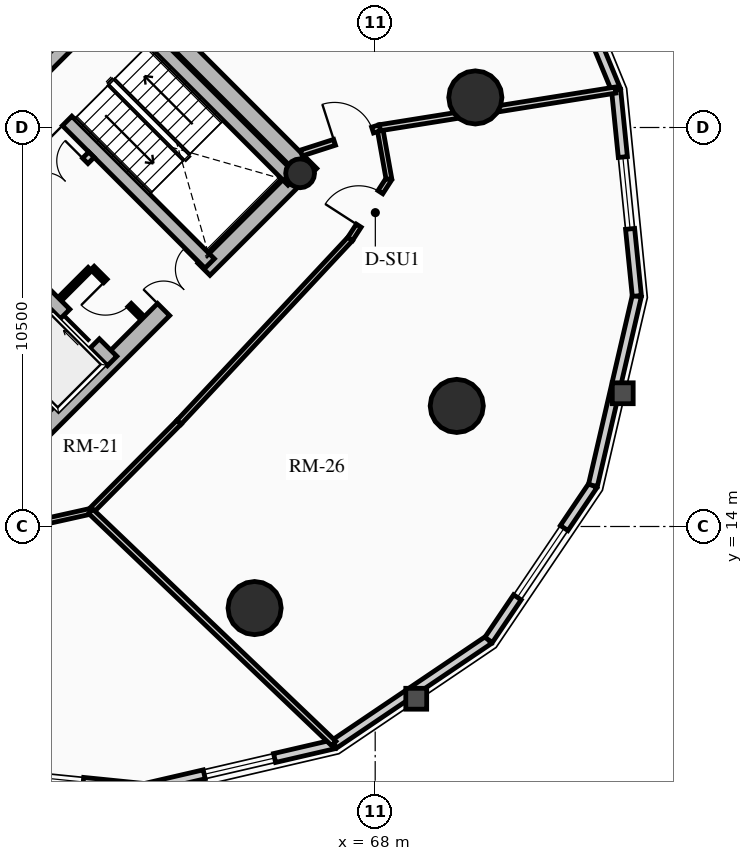
"""IFC4 building model, lengths in metres.
Left out: names, types, materials, properties, quantities, classifications, styles, units other than length and angle.
Written with IfcOpenShell. Run it as: python <this file> out.ifc"""

import sys

from ifc_helpers import new_model, si_unit, direction, frame, frame_2d, origin, origin_2d, place, context, subcontext, project, spatial, rectangle, circle, hollow_circle, extrude, source, transform, mapped, element, fill, save


model = new_model("IFC4")
c1 = context("Model", 3, precision=1e-05, world=origin(), true_north=direction((0.0, 1.0)))
c2 = subcontext(c1, "Body", "Model", "MODEL_VIEW")
j1 = project(units=[si_unit("LENGTHUNIT", "METRE"), si_unit("PLANEANGLEUNIT", "RADIAN")], contexts=[c1])
p1 = place(None, origin())
s1 = spatial("IfcSite", under=j1, at=p1, CompositionType="ELEMENT")
p2 = place(p1, origin())
s2 = spatial("IfcBuilding", under=s1, at=p2, CompositionType="ELEMENT")
p3 = place(p2, frame((0.0, 0.0, 132.88)))
s3 = spatial("IfcBuildingStorey", under=s2, at=p3, CompositionType="ELEMENT", Elevation=132.88)
p4 = place(p3, frame((66.303, 23.263, 0.0), z_axis=(0.0, 0.0, 1.0), x_axis=(-0.707106781187, 0.707106781187, 0.0)))
e1 = element("IfcWall", 1, at=p4, inside=s3, PredefinedType="SHEAR", context=c2, shape_type="SweptSolid", body=[
    extrude(rectangle(XDim=14.2, YDim=0.45, at=frame_2d((7.1, 0.0))), origin(), (0.0, 0.0, 1.0), 3.72),
])
p5 = place(p3, frame((58.578, 15.856, 0.0), z_axis=(0.0, 0.0, 1.0), x_axis=(0.707106781187, 0.707106781187, 0.0)))
e2 = element("IfcWall", 2, at=p5, inside=s3, PredefinedType="SHEAR", context=c2, shape_type="SweptSolid", body=[
    extrude(rectangle(XDim=10.7, YDim=0.45, at=frame_2d((5.35, 0.0))), origin(), (0.0, 0.0, 1.0), 3.72),
])
m1 = source(origin(), c2, "Body", "SweptSolid", [
    extrude(rectangle(XDim=1.5, YDim=2.02, at=frame_2d((0.75, 1.01))), frame((0.0, 0.235, 0.0), z_axis=(0.0, -1.0, 0.0), x_axis=(1.0, 0.0, 0.0)), (0.0, 0.0, 1.0), 0.47),
])
p6 = place(p5, frame((5.45, 0.0, 0.0)))
e3 = element("IfcOpeningElement", 3, at=p6, cuts=e2, PredefinedType="OPENING", context=c2, shape_type="MappedRepresentation", body=[
    mapped(m1, transform((0.0, 0.0, 0.0), x_axis=(1.0, 0.0, 0.0), y_axis=(0.0, 1.0, 0.0), z_axis=(0.0, 0.0, 1.0), scale=1.0)),
])
p7 = place(p3, frame((61.078, 18.355, 0.0), z_axis=(0.0, 0.0, 1.0), x_axis=(-0.707106781187, 0.707106781187, 0.0)))
e4 = element("IfcWall", 4, at=p7, inside=s3, PredefinedType="SHEAR", context=c2, shape_type="SweptSolid", body=[
    extrude(rectangle(XDim=13.75, YDim=0.35, at=frame_2d((6.875, 0.0))), origin(), (0.0, 0.0, 1.0), 3.72),
])
m2 = source(origin(), c2, "Body", "SweptSolid", [
    extrude(rectangle(XDim=1.1, YDim=2.015, at=frame_2d((0.55, 1.007))), frame((0.0, 0.185, 0.0), z_axis=(0.0, -1.0, 0.0), x_axis=(1.0, 0.0, 0.0)), (0.0, 0.0, 1.0), 0.37),
])
p8 = place(p7, frame((4.875, 0.0, 0.0)))
e5 = element("IfcOpeningElement", 5, at=p8, cuts=e4, PredefinedType="OPENING", context=c2, shape_type="MappedRepresentation", body=[
    mapped(m2, transform((0.0, 0.0, 0.0), x_axis=(1.0, 0.0, 0.0), y_axis=(0.0, 1.0, 0.0), z_axis=(0.0, 0.0, 1.0), scale=1.0)),
])
p9 = place(p7, frame((0.65, 0.0, 0.0)))
e6 = element("IfcOpeningElement", 6, at=p9, cuts=e4, PredefinedType="OPENING", context=c2, shape_type="MappedRepresentation", body=[
    mapped(m2, transform((0.0, 0.0, 0.0), x_axis=(1.0, 0.0, 0.0), y_axis=(0.0, 1.0, 0.0), z_axis=(0.0, 0.0, 1.0), scale=1.0)),
])
p10 = place(p7, frame((2.65, 0.0, 0.0)))
e7 = element("IfcOpeningElement", 7, at=p10, cuts=e4, PredefinedType="OPENING", context=c2, shape_type="MappedRepresentation", body=[
    mapped(m2, transform((0.0, 0.0, 0.0), x_axis=(1.0, 0.0, 0.0), y_axis=(0.0, 1.0, 0.0), z_axis=(0.0, 0.0, 1.0), scale=1.0)),
])
m3 = source(origin(), c2, "Body", "SweptSolid", [
    extrude(rectangle(XDim=1.15, YDim=2.02, at=frame_2d((0.575, 1.01))), frame((0.0, 0.185, 0.0), z_axis=(0.0, -1.0, 0.0), x_axis=(1.0, 0.0, 0.0)), (0.0, 0.0, 1.0), 0.37),
])
p11 = place(p7, frame((7.295, 0.0, 0.0)))
e8 = element("IfcOpeningElement", 8, at=p11, cuts=e4, PredefinedType="OPENING", context=c2, shape_type="MappedRepresentation", body=[
    mapped(m3, transform((0.0, 0.0, 0.0), x_axis=(1.0, 0.0, 0.0), y_axis=(0.0, 1.0, 0.0), z_axis=(0.0, 0.0, 1.0), scale=1.0)),
])
p12 = place(p3, frame((63.645, 20.922, 0.0), z_axis=(0.0, 0.0, 1.0), x_axis=(-0.707106781187, 0.707106781187, 0.0)))
e9 = element("IfcWall", 9, at=p12, inside=s3, PredefinedType="SHEAR", context=c2, shape_type="SweptSolid", body=[
    extrude(rectangle(XDim=13.75, YDim=0.35, at=frame_2d((6.875, 0.0))), origin(), (0.0, 0.0, 1.0), 3.72),
])
p13 = place(p12, frame((5.305, 0.0, 0.0)))
e10 = element("IfcOpeningElement", 10, at=p13, cuts=e9, PredefinedType="OPENING", context=c2, shape_type="MappedRepresentation", body=[
    mapped(m3, transform((0.0, 0.0, 0.0), x_axis=(1.0, 0.0, 0.0), y_axis=(0.0, 1.0, 0.0), z_axis=(0.0, 0.0, 1.0), scale=1.0)),
])
p14 = place(p3, frame((65.83, 23.107, 0.0), z_axis=(0.0, 0.0, 1.0), x_axis=(-0.707088616009, 0.707124945897, 0.0)))
e11 = element("IfcWall", 11, at=p14, inside=s3, PredefinedType="SHEAR", context=c2, shape_type="SweptSolid", body=[
    extrude(rectangle(XDim=6.72, YDim=0.35, at=frame_2d((3.36, 0.0))), origin(), (0.0, 0.0, 1.0), 3.72),
])
p15 = place(p3, frame((58.893, 25.674, 0.0), z_axis=(0.0, 0.0, 1.0), x_axis=(0.707106781187, 0.707106781187, 0.0)))
e12 = element("IfcWall", 12, at=p15, inside=s3, PredefinedType="SHEAR", context=c2, shape_type="SweptSolid", body=[
    extrude(rectangle(XDim=3.285, YDim=0.35, at=frame_2d((1.643, 0.0))), origin(), (0.0, 0.0, 1.0), 3.72),
])
p16 = place(p3, frame((66.024, 23.294, 0.0), z_axis=(0.0, 0.0, 1.0), x_axis=(0.707106781187, 0.707106781187, 0.0)))
e13 = element("IfcColumn", 13, at=p16, inside=s3, PredefinedType="COLUMN", context=c2, shape_type="SweptSolid", body=[
    extrude(hollow_circle(Radius=0.38, WallThickness=0.032, at=origin_2d()), origin(), (0.0, 0.0, 1.0), 3.72),
])
for number, where, z_axis, x_axis in (
    (14, (64.827, 11.854, 0.0), (0.0, 0.0, 1.0), (1.0, 0.0, 0.0)),
    (15, (70.146, 17.173, 0.0), (0.0, 0.0, 1.0), (1.0, 0.0, 0.0)),
    (16, (70.635, 25.291, 0.0), (0.0, 0.0, 1.0), (1.0, 0.0, 0.0)),
):
    element("IfcColumn", number, at=place(p3, frame(where, z_axis=z_axis, x_axis=x_axis)), inside=s3, PredefinedType="USERDEFINED", context=c2, shape_type="SweptSolid", body=[
        extrude(circle(Radius=0.7, at=origin_2d()), origin(), (0.0, 0.0, 1.0), 3.72),
    ])
p17 = place(p3, frame((61.933, 7.115, 0.0), z_axis=(0.0, 0.0, 1.0), x_axis=(-0.994971754311, 0.10015591906, 0.0)))
e17 = element("IfcWall", 17, at=p17, inside=s3, PredefinedType="SOLIDWALL", context=c2, shape_type="SweptSolid", body=[
    extrude(rectangle(XDim=5.448, YDim=0.24, at=frame_2d((2.724, 0.0))), origin(), (0.0, 0.0, 1.0), 2.949),
])
m4 = source(origin(), c2, "Body", "SweptSolid", [
    extrude(rectangle(XDim=2.2, YDim=1.35, at=frame_2d((1.1, 0.675))), frame((0.0, 0.13, 0.0), z_axis=(0.0, -1.0, 0.0), x_axis=(1.0, 0.0, 0.0)), (0.0, 0.0, 1.0), 0.26),
])
p18 = place(p17, frame((1.624, 0.0, 0.65)))
e18 = element("IfcOpeningElement", 18, at=p18, cuts=e17, PredefinedType="OPENING", context=c2, shape_type="MappedRepresentation", body=[
    mapped(m4, transform((0.0, 0.0, 0.0), x_axis=(1.0, 0.0, 0.0), y_axis=(0.0, 1.0, 0.0), z_axis=(0.0, 0.0, 1.0), scale=1.0)),
])
p19 = place(p3, frame((66.92, 8.271, 0.0), z_axis=(0.0, 0.0, 1.0), x_axis=(-0.974165631126, -0.225834725257, 0.0)))
e19 = element("IfcWall", 19, at=p19, inside=s3, PredefinedType="SOLIDWALL", context=c2, shape_type="SweptSolid", body=[
    extrude(rectangle(XDim=5.119, YDim=0.24, at=frame_2d((2.56, 0.0))), origin(), (0.0, 0.0, 1.0), 2.949),
])
m5 = source(origin(), c2, "Body", "SweptSolid", [
    extrude(rectangle(XDim=1.9, YDim=1.35, at=frame_2d((0.95, 0.675))), frame((0.0, 0.13, 0.0), z_axis=(0.0, -1.0, 0.0), x_axis=(1.0, 0.0, 0.0)), (0.0, 0.0, 1.0), 0.26),
])
p20 = place(p19, frame((1.609, 0.0, 0.65)))
e20 = element("IfcOpeningElement", 20, at=p20, cuts=e19, PredefinedType="OPENING", context=c2, shape_type="MappedRepresentation", body=[
    mapped(m5, transform((0.0, 0.0, 0.0), x_axis=(1.0, 0.0, 0.0), y_axis=(0.0, 1.0, 0.0), z_axis=(0.0, 0.0, 1.0), scale=1.0)),
])
p21 = place(p3, frame((70.985, 11.015, 0.0), z_axis=(0.0, 0.0, 1.0), x_axis=(-0.828781148131, -0.559572880421, 0.0)))
e21 = element("IfcWall", 21, at=p21, inside=s3, PredefinedType="SOLIDWALL", context=c2, shape_type="SweptSolid", body=[
    extrude(rectangle(XDim=4.905, YDim=0.24, at=frame_2d((2.452, 0.0))), origin(), (0.0, 0.0, 1.0), 2.949),
])
p22 = place(p3, frame((73.729, 15.08, 0.0), z_axis=(0.0, 0.0, 1.0), x_axis=(-0.559572880421, -0.828781148131, 0.0)))
e22 = element("IfcWall", 22, at=p22, inside=s3, PredefinedType="SOLIDWALL", context=c2, shape_type="SweptSolid", body=[
    extrude(rectangle(XDim=4.905, YDim=0.24, at=frame_2d((2.452, 0.0))), origin(), (0.0, 0.0, 1.0), 2.949),
])
p23 = place(p22, frame((1.352, 0.0, 0.65)))
e23 = element("IfcOpeningElement", 23, at=p23, cuts=e22, PredefinedType="OPENING", context=c2, shape_type="MappedRepresentation", body=[
    mapped(m4, transform((0.0, 0.0, 0.0), x_axis=(1.0, 0.0, 0.0), y_axis=(0.0, 1.0, 0.0), z_axis=(0.0, 0.0, 1.0), scale=1.0)),
])
p24 = place(p3, frame((74.885, 20.067, 0.0), z_axis=(0.0, 0.0, 1.0), x_axis=(-0.225834725257, -0.974165631126, 0.0)))
e24 = element("IfcWall", 24, at=p24, inside=s3, PredefinedType="SOLIDWALL", context=c2, shape_type="SweptSolid", body=[
    extrude(rectangle(XDim=5.119, YDim=0.24, at=frame_2d((2.56, 0.0))), origin(), (0.0, 0.0, 1.0), 2.949),
])
p25 = place(p3, frame((74.339, 25.487, 0.0), z_axis=(0.0, 0.0, 1.0), x_axis=(0.10015591906, -0.994971754311, 0.0)))
e25 = element("IfcWall", 25, at=p25, inside=s3, PredefinedType="SOLIDWALL", context=c2, shape_type="SweptSolid", body=[
    extrude(rectangle(XDim=5.448, YDim=0.24, at=frame_2d((2.724, 0.0))), origin(), (0.0, 0.0, 1.0), 2.949),
])
p26 = place(p25, frame((1.774, 0.0, 0.65)))
e26 = element("IfcOpeningElement", 26, at=p26, cuts=e25, PredefinedType="OPENING", context=c2, shape_type="MappedRepresentation", body=[
    mapped(m5, transform((0.0, 0.0, 0.0), x_axis=(1.0, 0.0, 0.0), y_axis=(0.0, 1.0, 0.0), z_axis=(0.0, 0.0, 1.0), scale=1.0)),
])
p27 = place(p3, frame((72.145, 30.811, 0.0), z_axis=(0.0, 0.0, 1.0), x_axis=(0.381027003055, -0.924563909604, 0.0)))
e27 = element("IfcWall", 27, at=p27, inside=s3, PredefinedType="SOLIDWALL", context=c2, shape_type="SweptSolid", body=[
    extrude(rectangle(XDim=5.758, YDim=0.24, at=frame_2d((2.879, 0.0))), origin(), (0.0, 0.0, 1.0), 2.949),
])
p28 = place(p3, frame((58.214, 21.467, 0.0), z_axis=(0.0, 0.0, 1.0), x_axis=(0.707106781187, 0.707106781187, 0.0)))
e28 = element("IfcWall", 28, at=p28, inside=s3, PredefinedType="PARTITIONING", context=c2, shape_type="SweptSolid", body=[
    extrude(rectangle(XDim=3.28, YDim=0.2, at=frame_2d((1.64, 0.0))), origin(), (0.0, 0.0, 1.0), 3.425),
])
m6 = source(origin(), c2, "Body", "SweptSolid", [
    extrude(rectangle(XDim=1.5, YDim=2.02, at=frame_2d((0.75, 1.01))), frame((0.0, 0.11, 0.0), z_axis=(0.0, -1.0, 0.0), x_axis=(1.0, 0.0, 0.0)), (0.0, 0.0, 1.0), 0.22),
])
p29 = place(p28, frame((1.55, 0.0, 0.0)))
e29 = element("IfcOpeningElement", 29, at=p29, cuts=e28, PredefinedType="OPENING", context=c2, shape_type="MappedRepresentation", body=[
    mapped(m6, transform((0.0, 0.0, 0.0), x_axis=(1.0, 0.0, 0.0), y_axis=(0.0, 1.0, 0.0), z_axis=(0.0, 0.0, 1.0), scale=1.0)),
])
p30 = place(p3, frame((61.835, 19.529, 0.0), z_axis=(0.0, 0.0, 1.0), x_axis=(-0.707174592913, 0.707038962956, 0.0)))
e30 = element("IfcWall", 30, at=p30, inside=s3, PredefinedType="PARTITIONING", context=c2, shape_type="SweptSolid", body=[
    extrude(rectangle(XDim=1.8, YDim=0.125, at=frame_2d((0.9, 0.0))), origin(), (0.0, 0.0, 1.0), 3.425),
])
m7 = source(origin(), c2, "Body", "SweptSolid", [
    extrude(rectangle(XDim=0.9, YDim=2.005, at=frame_2d((0.45, 1.002))), frame((0.0, 0.073, 0.0), z_axis=(0.0, -1.0, 0.0), x_axis=(1.0, 0.0, 0.0)), (0.0, 0.0, 1.0), 0.145),
])
p31 = place(p30, frame((0.42, 0.0, 0.0)))
e31 = element("IfcOpeningElement", 31, at=p31, cuts=e30, PredefinedType="OPENING", context=c2, shape_type="MappedRepresentation", body=[
    mapped(m7, transform((0.0, 0.0, 0.0), x_axis=(1.0, 0.0, 0.0), y_axis=(0.0, 1.0, 0.0), z_axis=(0.0, 0.0, 1.0), scale=1.0)),
])
p32 = place(p3, frame((59.713, 19.996, 0.0), z_axis=(0.0, 0.0, 1.0), x_axis=(0.707217726, 0.706995818963, 0.0)))
e32 = element("IfcWall", 32, at=p32, inside=s3, PredefinedType="PARTITIONING", context=c2, shape_type="SweptSolid", body=[
    extrude(rectangle(XDim=1.1, YDim=0.125, at=frame_2d((0.55, 0.0))), origin(), (0.0, 0.0, 1.0), 3.425),
])
p33 = place(p3, frame((58.971, 14.057, 0.0), z_axis=(0.0, 0.0, 1.0), x_axis=(0.976085233804, 0.217388169756, 0.0)))
e33 = element("IfcWall", 33, at=p33, inside=s3, PredefinedType="PARTITIONING", context=c2, shape_type="SweptSolid", body=[
    extrude(rectangle(XDim=1.581, YDim=0.15, at=frame_2d((0.791, 0.0))), origin(), (0.0, 0.0, 1.0), 2.995),
])
p34 = place(p3, frame((60.515, 14.401, 0.0), z_axis=(0.0, 0.0, 1.0), x_axis=(0.704179607439, 0.710021887316, 0.0)))
e34 = element("IfcWall", 34, at=p34, inside=s3, PredefinedType="PARTITIONING", context=c2, shape_type="SweptSolid", body=[
    extrude(rectangle(XDim=3.301, YDim=0.15, at=frame_2d((1.651, 0.0))), origin(), (0.0, 0.0, 1.0), 2.995),
])
p35 = place(p3, frame((62.839, 16.745, 0.0), z_axis=(0.0, 0.0, 1.0), x_axis=(0.682386779427, 0.73099130177, 0.0)))
e35 = element("IfcWall", 35, at=p35, inside=s3, PredefinedType="PARTITIONING", context=c2, shape_type="SweptSolid", body=[
    extrude(rectangle(XDim=6.6, YDim=0.15, at=frame_2d((3.3, 0.0))), origin(), (0.0, 0.0, 1.0), 2.995),
])
p36 = place(p3, frame((67.343, 21.569, 0.0), z_axis=(0.0, 0.0, 1.0), x_axis=(0.542722446786, 0.83991210597, 0.0)))
e36 = element("IfcWall", 36, at=p36, inside=s3, PredefinedType="PARTITIONING", context=c2, shape_type="SweptSolid", body=[
    extrude(rectangle(XDim=1.876, YDim=0.15, at=frame_2d((0.938, 0.0))), origin(), (0.0, 0.0, 1.0), 2.995),
])
m8 = source(origin(), c2, "Body", "SweptSolid", [
    extrude(rectangle(XDim=1.05, YDim=2.015, at=frame_2d((0.525, 1.007))), frame((0.0, 0.085, 0.0), z_axis=(0.0, -1.0, 0.0), x_axis=(1.0, 0.0, 0.0)), (0.0, 0.0, 1.0), 0.17),
])
p37 = place(p36, frame((0.413, 0.0, 0.0)))
e37 = element("IfcOpeningElement", 37, at=p37, cuts=e36, PredefinedType="OPENING", context=c2, shape_type="MappedRepresentation", body=[
    mapped(m8, transform((0.0, 0.0, 0.0), x_axis=(1.0, 0.0, 0.0), y_axis=(0.0, 1.0, 0.0), z_axis=(0.0, 0.0, 1.0), scale=1.0)),
])
p38 = place(p3, frame((68.362, 23.145, 0.0), z_axis=(0.0, 0.0, 1.0), x_axis=(-0.175605524171, 0.984460613677, 0.0)))
e38 = element("IfcWall", 38, at=p38, inside=s3, PredefinedType="PARTITIONING", context=c2, shape_type="SweptSolid", body=[
    extrude(rectangle(XDim=1.369, YDim=0.15, at=frame_2d((0.685, 0.0))), origin(), (0.0, 0.0, 1.0), 2.995),
])
p39 = place(p3, frame((60.515, 14.401, 0.0), z_axis=(0.0, 0.0, 1.0), x_axis=(0.722998961483, -0.690849116446, 0.0)))
e39 = element("IfcWall", 39, at=p39, inside=s3, PredefinedType="PARTITIONING", context=c2, shape_type="SweptSolid", body=[
    extrude(rectangle(XDim=8.847, YDim=0.16, at=frame_2d((4.423, 0.0))), origin(), (0.0, 0.0, 1.0), 2.949),
])
p40 = place(p3, frame((68.121, 24.493, 0.0), z_axis=(0.0, 0.0, 1.0), x_axis=(0.987466345552, 0.15782970697, 0.0)))
e40 = element("IfcWall", 40, at=p40, inside=s3, PredefinedType="PARTITIONING", context=c2, shape_type="SweptSolid", body=[
    extrude(rectangle(XDim=6.277, YDim=0.16, at=frame_2d((3.139, 0.0))), origin(), (0.0, 0.0, 1.0), 2.949),
])
p41 = place(p3, frame((66.056, 23.828, 0.0), z_axis=(0.0, 0.0, 1.0), x_axis=(0.951830504244, 0.306624674792, 0.0)))
e41 = element("IfcWall", 41, at=p41, inside=s3, PredefinedType="PARTITIONING", context=c2, shape_type="SweptSolid", body=[
    extrude(rectangle(XDim=2.17, YDim=0.16, at=frame_2d((1.085, 0.0))), origin(), (0.0, 0.0, 1.0), 2.995),
])
m9 = source(origin(), c2, "Body", "SweptSolid", [
    extrude(rectangle(XDim=1.05, YDim=2.015, at=frame_2d((0.525, 1.007))), frame((0.0, 0.09, 0.0), z_axis=(0.0, -1.0, 0.0), x_axis=(1.0, 0.0, 0.0)), (0.0, 0.0, 1.0), 0.18),
])
p42 = place(p41, frame((0.92, 0.0, 0.0)))
e42 = element("IfcOpeningElement", 42, at=p42, cuts=e41, PredefinedType="OPENING", context=c2, shape_type="MappedRepresentation", body=[
    mapped(m9, transform((0.0, 0.0, 0.0), x_axis=(1.0, 0.0, 0.0), y_axis=(0.0, 1.0, 0.0), z_axis=(0.0, 0.0, 1.0), scale=1.0)),
])
m10 = source(origin(), c2, "Body", "SweptSolid", [
    extrude(rectangle(XDim=2.2, YDim=1.35, at=frame_2d((1.1, 0.675))), frame((0.0, 0.03, 0.0), z_axis=(0.0, -1.0, 0.0), x_axis=(1.0, 0.0, 0.0)), (0.0, 0.0, 1.0), 0.06),
])
p43 = place(p18, origin())
e43 = element("IfcWindow", 43, at=p43, inside=s3, PartitioningType="DOUBLE_PANEL_VERTICAL", PredefinedType="WINDOW", context=c2, shape_type="MappedRepresentation", body=[
    mapped(m10, transform((0.0, 0.0, 0.0), x_axis=(1.0, 0.0, 0.0), y_axis=(0.0, 1.0, 0.0), z_axis=(0.0, 0.0, 1.0), scale=1.0)),
])
fill(e18, e43)
m11 = source(origin(), c2, "Body", "SweptSolid", [
    extrude(rectangle(XDim=1.9, YDim=1.35, at=frame_2d((0.95, 0.675))), frame((0.0, 0.03, 0.0), z_axis=(0.0, -1.0, 0.0), x_axis=(1.0, 0.0, 0.0)), (0.0, 0.0, 1.0), 0.06),
])
p44 = place(p20, origin())
e44 = element("IfcWindow", 44, at=p44, inside=s3, PartitioningType="DOUBLE_PANEL_VERTICAL", PredefinedType="WINDOW", context=c2, shape_type="MappedRepresentation", body=[
    mapped(m11, transform((0.0, 0.0, 0.0), x_axis=(1.0, 0.0, 0.0), y_axis=(0.0, 1.0, 0.0), z_axis=(0.0, 0.0, 1.0), scale=1.0)),
])
fill(e20, e44)
p45 = place(p23, origin())
e45 = element("IfcWindow", 45, at=p45, inside=s3, PartitioningType="DOUBLE_PANEL_VERTICAL", PredefinedType="WINDOW", context=c2, shape_type="MappedRepresentation", body=[
    mapped(m10, transform((0.0, 0.0, 0.0), x_axis=(1.0, 0.0, 0.0), y_axis=(0.0, 1.0, 0.0), z_axis=(0.0, 0.0, 1.0), scale=1.0)),
])
fill(e23, e45)
p46 = place(p26, origin())
e46 = element("IfcWindow", 46, at=p46, inside=s3, PartitioningType="DOUBLE_PANEL_VERTICAL", PredefinedType="WINDOW", context=c2, shape_type="MappedRepresentation", body=[
    mapped(m11, transform((0.0, 0.0, 0.0), x_axis=(1.0, 0.0, 0.0), y_axis=(0.0, 1.0, 0.0), z_axis=(0.0, 0.0, 1.0), scale=1.0)),
])
fill(e26, e46)
m12 = source(origin(), c2, "Body", "SweptSolid", [
    extrude(rectangle(XDim=1.1, YDim=2.015, at=frame_2d((0.55, 1.007))), frame((0.0, 0.025, 0.0), z_axis=(0.0, -1.0, 0.0), x_axis=(1.0, 0.0, 0.0)), (0.0, 0.0, 1.0), 0.05),
])
p47 = place(p9, origin())
e47 = element("IfcDoor", 47, at=p47, inside=s3, OperationType="SLIDING_TO_RIGHT", PredefinedType="DOOR", context=c2, shape_type="MappedRepresentation", body=[
    mapped(m12, transform((0.0, 0.0, 0.0), x_axis=(1.0, 0.0, 0.0), y_axis=(0.0, 1.0, 0.0), z_axis=(0.0, 0.0, 1.0), scale=1.0)),
])
fill(e6, e47)
m13 = source(origin(), c2, "Body", "SweptSolid", [
    extrude(rectangle(XDim=1.15, YDim=2.02, at=frame_2d((0.575, 1.01))), frame((0.0, 0.025, 0.0), z_axis=(0.0, -1.0, 0.0), x_axis=(1.0, 0.0, 0.0)), (0.0, 0.0, 1.0), 0.05),
])
p48 = place(p13, origin())
e48 = element("IfcDoor", 48, at=p48, inside=s3, OperationType="SINGLE_SWING_LEFT", PredefinedType="DOOR", context=c2, shape_type="MappedRepresentation", body=[
    mapped(m13, transform((0.0, 0.0, 0.0), x_axis=(1.0, 0.0, 0.0), y_axis=(0.0, 1.0, 0.0), z_axis=(0.0, 0.0, 1.0), scale=1.0)),
])
fill(e10, e48)
m14 = source(origin(), c2, "Body", "SweptSolid", [
    extrude(rectangle(XDim=1.5, YDim=2.02, at=frame_2d((0.75, 1.01))), frame((0.0, 0.025, 0.0), z_axis=(0.0, -1.0, 0.0), x_axis=(1.0, 0.0, 0.0)), (0.0, 0.0, 1.0), 0.05),
])
p49 = place(p6, origin())
e49 = element("IfcDoor", 49, at=p49, inside=s3, OperationType="DOUBLE_DOOR_SINGLE_SWING", PredefinedType="DOOR", context=c2, shape_type="MappedRepresentation", body=[
    mapped(m14, transform((0.0, 0.0, 0.0), x_axis=(1.0, 0.0, 0.0), y_axis=(0.0, 1.0, 0.0), z_axis=(0.0, 0.0, 1.0), scale=1.0)),
])
fill(e3, e49)
p50 = place(p29, origin())
e50 = element("IfcDoor", 50, at=p50, inside=s3, OperationType="DOUBLE_DOOR_SINGLE_SWING", PredefinedType="DOOR", context=c2, shape_type="MappedRepresentation", body=[
    mapped(m14, transform((0.0, 0.0, 0.0), x_axis=(1.0, 0.0, 0.0), y_axis=(0.0, 1.0, 0.0), z_axis=(0.0, 0.0, 1.0), scale=1.0)),
])
fill(e29, e50)
m15 = source(origin(), c2, "Body", "SweptSolid", [
    extrude(rectangle(XDim=0.9, YDim=2.005, at=frame_2d((0.45, 1.002))), frame((0.0, 0.025, 0.0), z_axis=(0.0, -1.0, 0.0), x_axis=(1.0, 0.0, 0.0)), (0.0, 0.0, 1.0), 0.05),
])
p51 = place(p31, origin())
e51 = element("IfcDoor", 51, at=p51, inside=s3, OperationType="SINGLE_SWING_RIGHT", PredefinedType="DOOR", context=c2, shape_type="MappedRepresentation", body=[
    mapped(m15, transform((0.0, 0.0, 0.0), x_axis=(1.0, 0.0, 0.0), y_axis=(0.0, 1.0, 0.0), z_axis=(0.0, 0.0, 1.0), scale=1.0)),
])
fill(e31, e51)
m16 = source(origin(), c2, "Body", "SweptSolid", [
    extrude(rectangle(XDim=1.05, YDim=2.015, at=frame_2d((0.525, 1.007))), frame((0.0, 0.025, 0.0), z_axis=(0.0, -1.0, 0.0), x_axis=(1.0, 0.0, 0.0)), (0.0, 0.0, 1.0), 0.05),
])
p52 = place(p42, origin())
e52 = element("IfcDoor", 52, at=p52, inside=s3, OperationType="SINGLE_SWING_LEFT", PredefinedType="DOOR", context=c2, shape_type="MappedRepresentation", body=[
    mapped(m16, transform((0.0, 0.0, 0.0), x_axis=(1.0, 0.0, 0.0), y_axis=(0.0, 1.0, 0.0), z_axis=(0.0, 0.0, 1.0), scale=1.0)),
])
fill(e42, e52)
p53 = place(p37, origin())
e53 = element("IfcDoor", 53, at=p53, inside=s3, OperationType="SINGLE_SWING_LEFT", PredefinedType="DOOR", context=c2, shape_type="MappedRepresentation", body=[
    mapped(m16, transform((0.0, 0.0, 0.0), x_axis=(1.0, 0.0, 0.0), y_axis=(0.0, 1.0, 0.0), z_axis=(0.0, 0.0, 1.0), scale=1.0)),
])
fill(e37, e53)
save(model, sys.argv[1])
